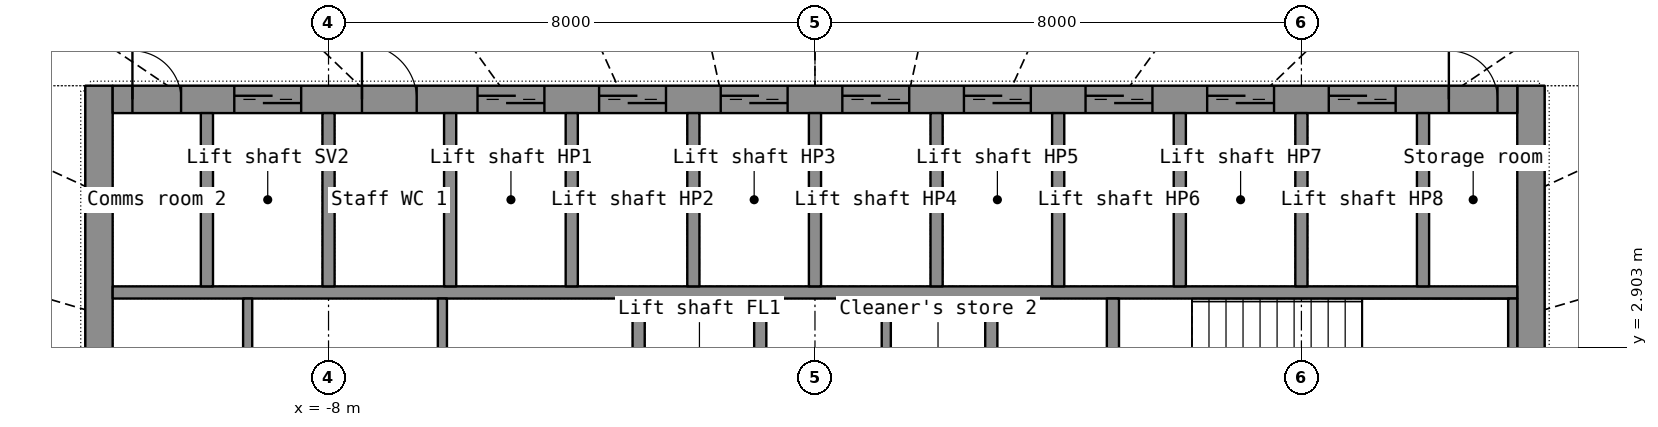
"""IFC4 building model, lengths in metres.
Left out: names, types, materials, properties, quantities, classifications, styles, units other than length and angle.
Written with IfcOpenShell. Run it as: python <this file> out.ifc"""

import sys

from ifc_helpers import new_model, si_unit, direction, frame, frame_2d, origin, place, context, subcontext, project, spatial, rectangle, extrude, element, fill, save


model = new_model("IFC4")
c1 = context("Model", 3, precision=1e-05, world=origin(), true_north=direction((0.0, 1.0)))
c2 = subcontext(c1, "Body", "Model", "MODEL_VIEW")
j1 = project(units=[si_unit("LENGTHUNIT", "METRE"), si_unit("PLANEANGLEUNIT", "RADIAN")], contexts=[c1])
p1 = place(None, origin())
s1 = spatial("IfcSite", under=j1, at=p1, CompositionType="ELEMENT")
p2 = place(p1, origin())
s2 = spatial("IfcBuilding", under=s1, at=p2, CompositionType="ELEMENT")
p3 = place(p2, frame((0.0, 0.0, 183.0)))
s3 = spatial("IfcBuildingStorey", under=s2, at=p3, CompositionType="ELEMENT", Elevation=183.0)
p4 = place(p3, frame((-11.775, -7.2, 0.0), z_axis=(0.0, 0.0, 1.0), x_axis=(0.0, 1.0, 0.0)))
e1 = element("IfcWall", 1, at=p4, inside=s3, PredefinedType="SHEAR", context=c2, shape_type="SweptSolid", body=[
    extrude(rectangle(XDim=14.4, YDim=0.45, at=frame_2d((7.2, 0.0))), origin(), (0.0, 0.0, 1.0), 3.3),
])
p5 = place(p4, frame((6.5, 0.0, 0.0)))
e2 = element("IfcOpeningElement", 2, at=p5, cuts=e1, PredefinedType="OPENING", context=c2, shape_type="SweptSolid", body=[
    extrude(rectangle(XDim=1.4, YDim=2.2, at=frame_2d((0.7, 1.1))), frame((0.0, 0.235, 0.0), z_axis=(0.0, -1.0, 0.0), x_axis=(1.0, 0.0, 0.0)), (0.0, 0.0, 1.0), 0.47),
])
p6 = place(p3, frame((11.775, -7.2, 0.0), z_axis=(0.0, 0.0, 1.0), x_axis=(0.0, 1.0, 0.0)))
e3 = element("IfcWall", 3, at=p6, inside=s3, PredefinedType="SHEAR", context=c2, shape_type="SweptSolid", body=[
    extrude(rectangle(XDim=14.4, YDim=0.45, at=frame_2d((7.2, 0.0))), origin(), (0.0, 0.0, 1.0), 3.3),
])
p7 = place(p6, frame((6.5, 0.0, 0.0)))
e4 = element("IfcOpeningElement", 4, at=p7, cuts=e3, PredefinedType="OPENING", context=c2, shape_type="SweptSolid", body=[
    extrude(rectangle(XDim=1.4, YDim=2.2, at=frame_2d((0.7, 1.1))), frame((0.0, 0.235, 0.0), z_axis=(0.0, -1.0, 0.0), x_axis=(1.0, 0.0, 0.0)), (0.0, 0.0, 1.0), 0.47),
])
p8 = place(p3, frame((-11.55, 6.975, 0.0), z_axis=(0.0, 0.0, 1.0), x_axis=(1.0, 0.0, 0.0)))
e5 = element("IfcWall", 5, at=p8, inside=s3, PredefinedType="SHEAR", context=c2, shape_type="SweptSolid", body=[
    extrude(rectangle(XDim=23.1, YDim=0.45, at=frame_2d((11.55, 0.0))), origin(), (0.0, 0.0, 1.0), 3.3),
])
p9 = place(p8, frame((2.0, 0.0, 0.0)))
e6 = element("IfcOpeningElement", 6, at=p9, cuts=e5, PredefinedType="OPENING", context=c2, shape_type="SweptSolid", body=[
    extrude(rectangle(XDim=1.1, YDim=2.2, at=frame_2d((0.55, 1.1))), frame((0.0, 0.235, 0.0), z_axis=(0.0, -1.0, 0.0), x_axis=(1.0, 0.0, 0.0)), (0.0, 0.0, 1.0), 0.47),
])
p10 = place(p8, frame((6.0, 0.0, 0.0)))
e7 = element("IfcOpeningElement", 7, at=p10, cuts=e5, PredefinedType="OPENING", context=c2, shape_type="SweptSolid", body=[
    extrude(rectangle(XDim=1.1, YDim=2.2, at=frame_2d((0.55, 1.1))), frame((0.0, 0.235, 0.0), z_axis=(0.0, -1.0, 0.0), x_axis=(1.0, 0.0, 0.0)), (0.0, 0.0, 1.0), 0.47),
])
p11 = place(p8, frame((8.0, 0.0, 0.0)))
e8 = element("IfcOpeningElement", 8, at=p11, cuts=e5, PredefinedType="OPENING", context=c2, shape_type="SweptSolid", body=[
    extrude(rectangle(XDim=1.1, YDim=2.2, at=frame_2d((0.55, 1.1))), frame((0.0, 0.235, 0.0), z_axis=(0.0, -1.0, 0.0), x_axis=(1.0, 0.0, 0.0)), (0.0, 0.0, 1.0), 0.47),
])
p12 = place(p8, frame((10.0, 0.0, 0.0)))
e9 = element("IfcOpeningElement", 9, at=p12, cuts=e5, PredefinedType="OPENING", context=c2, shape_type="SweptSolid", body=[
    extrude(rectangle(XDim=1.1, YDim=2.2, at=frame_2d((0.55, 1.1))), frame((0.0, 0.235, 0.0), z_axis=(0.0, -1.0, 0.0), x_axis=(1.0, 0.0, 0.0)), (0.0, 0.0, 1.0), 0.47),
])
p13 = place(p8, frame((12.0, 0.0, 0.0)))
e10 = element("IfcOpeningElement", 10, at=p13, cuts=e5, PredefinedType="OPENING", context=c2, shape_type="SweptSolid", body=[
    extrude(rectangle(XDim=1.1, YDim=2.2, at=frame_2d((0.55, 1.1))), frame((0.0, 0.235, 0.0), z_axis=(0.0, -1.0, 0.0), x_axis=(1.0, 0.0, 0.0)), (0.0, 0.0, 1.0), 0.47),
])
p14 = place(p8, frame((14.0, 0.0, 0.0)))
e11 = element("IfcOpeningElement", 11, at=p14, cuts=e5, PredefinedType="OPENING", context=c2, shape_type="SweptSolid", body=[
    extrude(rectangle(XDim=1.1, YDim=2.2, at=frame_2d((0.55, 1.1))), frame((0.0, 0.235, 0.0), z_axis=(0.0, -1.0, 0.0), x_axis=(1.0, 0.0, 0.0)), (0.0, 0.0, 1.0), 0.47),
])
p15 = place(p8, frame((16.0, 0.0, 0.0)))
e12 = element("IfcOpeningElement", 12, at=p15, cuts=e5, PredefinedType="OPENING", context=c2, shape_type="SweptSolid", body=[
    extrude(rectangle(XDim=1.1, YDim=2.2, at=frame_2d((0.55, 1.1))), frame((0.0, 0.235, 0.0), z_axis=(0.0, -1.0, 0.0), x_axis=(1.0, 0.0, 0.0)), (0.0, 0.0, 1.0), 0.47),
])
p16 = place(p8, frame((18.0, 0.0, 0.0)))
e13 = element("IfcOpeningElement", 13, at=p16, cuts=e5, PredefinedType="OPENING", context=c2, shape_type="SweptSolid", body=[
    extrude(rectangle(XDim=1.1, YDim=2.2, at=frame_2d((0.55, 1.1))), frame((0.0, 0.235, 0.0), z_axis=(0.0, -1.0, 0.0), x_axis=(1.0, 0.0, 0.0)), (0.0, 0.0, 1.0), 0.47),
])
p17 = place(p8, frame((20.0, 0.0, 0.0)))
e14 = element("IfcOpeningElement", 14, at=p17, cuts=e5, PredefinedType="OPENING", context=c2, shape_type="SweptSolid", body=[
    extrude(rectangle(XDim=1.1, YDim=2.2, at=frame_2d((0.55, 1.1))), frame((0.0, 0.235, 0.0), z_axis=(0.0, -1.0, 0.0), x_axis=(1.0, 0.0, 0.0)), (0.0, 0.0, 1.0), 0.47),
])
p18 = place(p8, frame((4.1, 0.0, 0.0)))
e15 = element("IfcOpeningElement", 15, at=p18, cuts=e5, PredefinedType="OPENING", context=c2, shape_type="SweptSolid", body=[
    extrude(rectangle(XDim=0.9, YDim=2.1, at=frame_2d((0.45, 1.05))), frame((0.0, 0.235, 0.0), z_axis=(0.0, -1.0, 0.0), x_axis=(1.0, 0.0, 0.0)), (0.0, 0.0, 1.0), 0.47),
])
p19 = place(p8, frame((0.325, 0.0, 0.0)))
e16 = element("IfcOpeningElement", 16, at=p19, cuts=e5, PredefinedType="OPENING", context=c2, shape_type="SweptSolid", body=[
    extrude(rectangle(XDim=0.8, YDim=2.05, at=frame_2d((0.4, 1.025))), frame((0.0, 0.235, 0.0), z_axis=(0.0, -1.0, 0.0), x_axis=(1.0, 0.0, 0.0)), (0.0, 0.0, 1.0), 0.47),
])
p20 = place(p8, frame((21.975, 0.0, 0.0)))
e17 = element("IfcOpeningElement", 17, at=p20, cuts=e5, PredefinedType="OPENING", context=c2, shape_type="SweptSolid", body=[
    extrude(rectangle(XDim=0.8, YDim=2.05, at=frame_2d((0.4, 1.025))), frame((0.0, 0.235, 0.0), z_axis=(0.0, -1.0, 0.0), x_axis=(1.0, 0.0, 0.0)), (0.0, 0.0, 1.0), 0.47),
])
p21 = place(p3, frame((-11.55, 3.8, 0.0), z_axis=(0.0, 0.0, 1.0), x_axis=(1.0, 0.0, 0.0)))
e18 = element("IfcWall", 18, at=p21, inside=s3, PredefinedType="SHEAR", context=c2, shape_type="SweptSolid", body=[
    extrude(rectangle(XDim=23.1, YDim=0.2, at=frame_2d((11.55, 0.0))), origin(), (0.0, 0.0, 1.0), 3.3),
])
for number, where, z_axis, x_axis in (
    (19, (-10.0, 3.9, 0.0), (0.0, 0.0, 1.0), (0.0, 1.0, 0.0)),
    (20, (-8.0, 3.9, 0.0), (0.0, 0.0, 1.0), (0.0, 1.0, 0.0)),
    (21, (-6.0, 3.9, 0.0), (0.0, 0.0, 1.0), (0.0, 1.0, 0.0)),
    (22, (-4.0, 3.9, 0.0), (0.0, 0.0, 1.0), (0.0, 1.0, 0.0)),
    (23, (-2.0, 3.9, 0.0), (0.0, 0.0, 1.0), (0.0, 1.0, 0.0)),
    (24, (0.0, 3.9, 0.0), (0.0, 0.0, 1.0), (0.0, 1.0, 0.0)),
    (25, (2.0, 3.9, 0.0), (0.0, 0.0, 1.0), (0.0, 1.0, 0.0)),
    (26, (4.0, 3.9, 0.0), (0.0, 0.0, 1.0), (0.0, 1.0, 0.0)),
    (27, (6.0, 3.9, 0.0), (0.0, 0.0, 1.0), (0.0, 1.0, 0.0)),
    (28, (8.0, 3.9, 0.0), (0.0, 0.0, 1.0), (0.0, 1.0, 0.0)),
    (29, (10.0, 3.9, 0.0), (0.0, 0.0, 1.0), (0.0, 1.0, 0.0)),
):
    element("IfcWall", number, at=place(p3, frame(where, z_axis=z_axis, x_axis=x_axis)), inside=s3, PredefinedType="SHEAR", context=c2, shape_type="SweptSolid", body=[
        extrude(rectangle(XDim=2.85, YDim=0.2, at=frame_2d((1.425, 0.0))), origin(), (0.0, 0.0, 1.0), 3.3),
    ])
p22 = place(p3, frame((-2.9, -3.7, 0.0), z_axis=(0.0, 0.0, 1.0), x_axis=(0.0, 1.0, 0.0)))
e30 = element("IfcWall", 30, at=p22, inside=s3, PredefinedType="SHEAR", context=c2, shape_type="SweptSolid", body=[
    extrude(rectangle(XDim=7.4, YDim=0.2, at=frame_2d((3.7, 0.0))), origin(), (0.0, 0.0, 1.0), 3.3),
])
p23 = place(p22, frame((3.1, 0.0, 0.0)))
e31 = element("IfcOpeningElement", 31, at=p23, cuts=e30, PredefinedType="OPENING", context=c2, shape_type="SweptSolid", body=[
    extrude(rectangle(XDim=1.2, YDim=2.2, at=frame_2d((0.6, 1.1))), frame((0.0, 0.11, 0.0), z_axis=(0.0, -1.0, 0.0), x_axis=(1.0, 0.0, 0.0)), (0.0, 0.0, 1.0), 0.22),
])
p24 = place(p3, frame((2.9, -3.7, 0.0), z_axis=(0.0, 0.0, 1.0), x_axis=(0.0, 1.0, 0.0)))
e32 = element("IfcWall", 32, at=p24, inside=s3, PredefinedType="SHEAR", context=c2, shape_type="SweptSolid", body=[
    extrude(rectangle(XDim=7.4, YDim=0.2, at=frame_2d((3.7, 0.0))), origin(), (0.0, 0.0, 1.0), 3.3),
])
p25 = place(p24, frame((3.1, 0.0, 0.0)))
e33 = element("IfcOpeningElement", 33, at=p25, cuts=e32, PredefinedType="OPENING", context=c2, shape_type="SweptSolid", body=[
    extrude(rectangle(XDim=1.2, YDim=2.2, at=frame_2d((0.6, 1.1))), frame((0.0, 0.11, 0.0), z_axis=(0.0, -1.0, 0.0), x_axis=(1.0, 0.0, 0.0)), (0.0, 0.0, 1.0), 0.22),
])
p26 = place(p3, frame((-0.9, 1.35, 0.0), z_axis=(0.0, 0.0, 1.0), x_axis=(0.0, 1.0, 0.0)))
e34 = element("IfcWall", 34, at=p26, inside=s3, PredefinedType="SHEAR", context=c2, shape_type="SweptSolid", body=[
    extrude(rectangle(XDim=2.35, YDim=0.2, at=frame_2d((1.175, 0.0))), origin(), (0.0, 0.0, 1.0), 3.3),
])
p27 = place(p3, frame((11.475, 1.35, 0.0), z_axis=(0.0, 0.0, 1.0), x_axis=(0.0, 1.0, 0.0)))
e35 = element("IfcWall", 35, at=p27, inside=s3, PredefinedType="SHEAR", context=c2, shape_type="SweptSolid", body=[
    extrude(rectangle(XDim=2.35, YDim=0.15, at=frame_2d((1.175, 0.0))), origin(), (0.0, 0.0, 1.0), 3.3),
])
p28 = place(p3, frame((4.9, 1.35, 0.0), z_axis=(0.0, 0.0, 1.0), x_axis=(0.0, 1.0, 0.0)))
e36 = element("IfcWall", 36, at=p28, inside=s3, PredefinedType="SHEAR", context=c2, shape_type="SweptSolid", body=[
    extrude(rectangle(XDim=2.35, YDim=0.2, at=frame_2d((1.175, 0.0))), origin(), (0.0, 0.0, 1.0), 3.3),
])
for number, where, z_axis, x_axis in (
    (37, (-9.33, 1.35, 0.0), (0.0, 0.0, 1.0), (0.0, 1.0, 0.0)),
    (38, (-6.127, 1.35, 0.0), (0.0, 0.0, 1.0), (0.0, 1.0, 0.0)),
    (39, (1.173, 1.35, 0.0), (0.0, 0.0, 1.0), (0.0, 1.0, 0.0)),
):
    element("IfcWall", number, at=place(p3, frame(where, z_axis=z_axis, x_axis=x_axis)), inside=s3, PredefinedType="PARTITIONING", context=c2, shape_type="SweptSolid", body=[
        extrude(rectangle(XDim=2.35, YDim=0.15, at=frame_2d((1.175, 0.0))), origin(), (0.0, 0.0, 1.0), 3.3),
    ])
p29 = place(p9, origin())
e40 = element("IfcDoor", 40, at=p29, inside=s3, OperationType="DOUBLE_DOOR_SLIDING", PredefinedType="DOOR", context=c2, shape_type="SweptSolid", body=[
    extrude(rectangle(XDim=1.1, YDim=2.2, at=frame_2d((0.55, 1.1))), frame((0.0, 0.025, 0.0), z_axis=(0.0, -1.0, 0.0), x_axis=(1.0, 0.0, 0.0)), (0.0, 0.0, 1.0), 0.05),
])
fill(e6, e40)
p30 = place(p10, origin())
e41 = element("IfcDoor", 41, at=p30, inside=s3, OperationType="DOUBLE_DOOR_SLIDING", PredefinedType="DOOR", context=c2, shape_type="SweptSolid", body=[
    extrude(rectangle(XDim=1.1, YDim=2.2, at=frame_2d((0.55, 1.1))), frame((0.0, 0.025, 0.0), z_axis=(0.0, -1.0, 0.0), x_axis=(1.0, 0.0, 0.0)), (0.0, 0.0, 1.0), 0.05),
])
fill(e7, e41)
p31 = place(p11, origin())
e42 = element("IfcDoor", 42, at=p31, inside=s3, OperationType="DOUBLE_DOOR_SLIDING", PredefinedType="DOOR", context=c2, shape_type="SweptSolid", body=[
    extrude(rectangle(XDim=1.1, YDim=2.2, at=frame_2d((0.55, 1.1))), frame((0.0, 0.025, 0.0), z_axis=(0.0, -1.0, 0.0), x_axis=(1.0, 0.0, 0.0)), (0.0, 0.0, 1.0), 0.05),
])
fill(e8, e42)
p32 = place(p12, origin())
e43 = element("IfcDoor", 43, at=p32, inside=s3, OperationType="DOUBLE_DOOR_SLIDING", PredefinedType="DOOR", context=c2, shape_type="SweptSolid", body=[
    extrude(rectangle(XDim=1.1, YDim=2.2, at=frame_2d((0.55, 1.1))), frame((0.0, 0.025, 0.0), z_axis=(0.0, -1.0, 0.0), x_axis=(1.0, 0.0, 0.0)), (0.0, 0.0, 1.0), 0.05),
])
fill(e9, e43)
p33 = place(p13, origin())
e44 = element("IfcDoor", 44, at=p33, inside=s3, OperationType="DOUBLE_DOOR_SLIDING", PredefinedType="DOOR", context=c2, shape_type="SweptSolid", body=[
    extrude(rectangle(XDim=1.1, YDim=2.2, at=frame_2d((0.55, 1.1))), frame((0.0, 0.025, 0.0), z_axis=(0.0, -1.0, 0.0), x_axis=(1.0, 0.0, 0.0)), (0.0, 0.0, 1.0), 0.05),
])
fill(e10, e44)
p34 = place(p14, origin())
e45 = element("IfcDoor", 45, at=p34, inside=s3, OperationType="DOUBLE_DOOR_SLIDING", PredefinedType="DOOR", context=c2, shape_type="SweptSolid", body=[
    extrude(rectangle(XDim=1.1, YDim=2.2, at=frame_2d((0.55, 1.1))), frame((0.0, 0.025, 0.0), z_axis=(0.0, -1.0, 0.0), x_axis=(1.0, 0.0, 0.0)), (0.0, 0.0, 1.0), 0.05),
])
fill(e11, e45)
p35 = place(p15, origin())
e46 = element("IfcDoor", 46, at=p35, inside=s3, OperationType="DOUBLE_DOOR_SLIDING", PredefinedType="DOOR", context=c2, shape_type="SweptSolid", body=[
    extrude(rectangle(XDim=1.1, YDim=2.2, at=frame_2d((0.55, 1.1))), frame((0.0, 0.025, 0.0), z_axis=(0.0, -1.0, 0.0), x_axis=(1.0, 0.0, 0.0)), (0.0, 0.0, 1.0), 0.05),
])
fill(e12, e46)
p36 = place(p16, origin())
e47 = element("IfcDoor", 47, at=p36, inside=s3, OperationType="DOUBLE_DOOR_SLIDING", PredefinedType="DOOR", context=c2, shape_type="SweptSolid", body=[
    extrude(rectangle(XDim=1.1, YDim=2.2, at=frame_2d((0.55, 1.1))), frame((0.0, 0.025, 0.0), z_axis=(0.0, -1.0, 0.0), x_axis=(1.0, 0.0, 0.0)), (0.0, 0.0, 1.0), 0.05),
])
fill(e13, e47)
p37 = place(p17, origin())
e48 = element("IfcDoor", 48, at=p37, inside=s3, OperationType="DOUBLE_DOOR_SLIDING", PredefinedType="DOOR", context=c2, shape_type="SweptSolid", body=[
    extrude(rectangle(XDim=1.1, YDim=2.2, at=frame_2d((0.55, 1.1))), frame((0.0, 0.025, 0.0), z_axis=(0.0, -1.0, 0.0), x_axis=(1.0, 0.0, 0.0)), (0.0, 0.0, 1.0), 0.05),
])
fill(e14, e48)
p38 = place(p18, origin())
e49 = element("IfcDoor", 49, at=p38, inside=s3, OperationType="SINGLE_SWING_LEFT", PredefinedType="DOOR", context=c2, shape_type="SweptSolid", body=[
    extrude(rectangle(XDim=0.9, YDim=2.1, at=frame_2d((0.45, 1.05))), frame((0.0, 0.025, 0.0), z_axis=(0.0, -1.0, 0.0), x_axis=(1.0, 0.0, 0.0)), (0.0, 0.0, 1.0), 0.05),
])
fill(e15, e49)
p39 = place(p19, origin())
e50 = element("IfcDoor", 50, at=p39, inside=s3, OperationType="SINGLE_SWING_LEFT", PredefinedType="DOOR", context=c2, shape_type="SweptSolid", body=[
    extrude(rectangle(XDim=0.8, YDim=2.05, at=frame_2d((0.4, 1.025))), frame((0.0, 0.025, 0.0), z_axis=(0.0, -1.0, 0.0), x_axis=(1.0, 0.0, 0.0)), (0.0, 0.0, 1.0), 0.05),
])
fill(e16, e50)
p40 = place(p20, origin())
e51 = element("IfcDoor", 51, at=p40, inside=s3, OperationType="SINGLE_SWING_LEFT", PredefinedType="DOOR", context=c2, shape_type="SweptSolid", body=[
    extrude(rectangle(XDim=0.8, YDim=2.05, at=frame_2d((0.4, 1.025))), frame((0.0, 0.025, 0.0), z_axis=(0.0, -1.0, 0.0), x_axis=(1.0, 0.0, 0.0)), (0.0, 0.0, 1.0), 0.05),
])
fill(e17, e51)
save(model, sys.argv[1])
